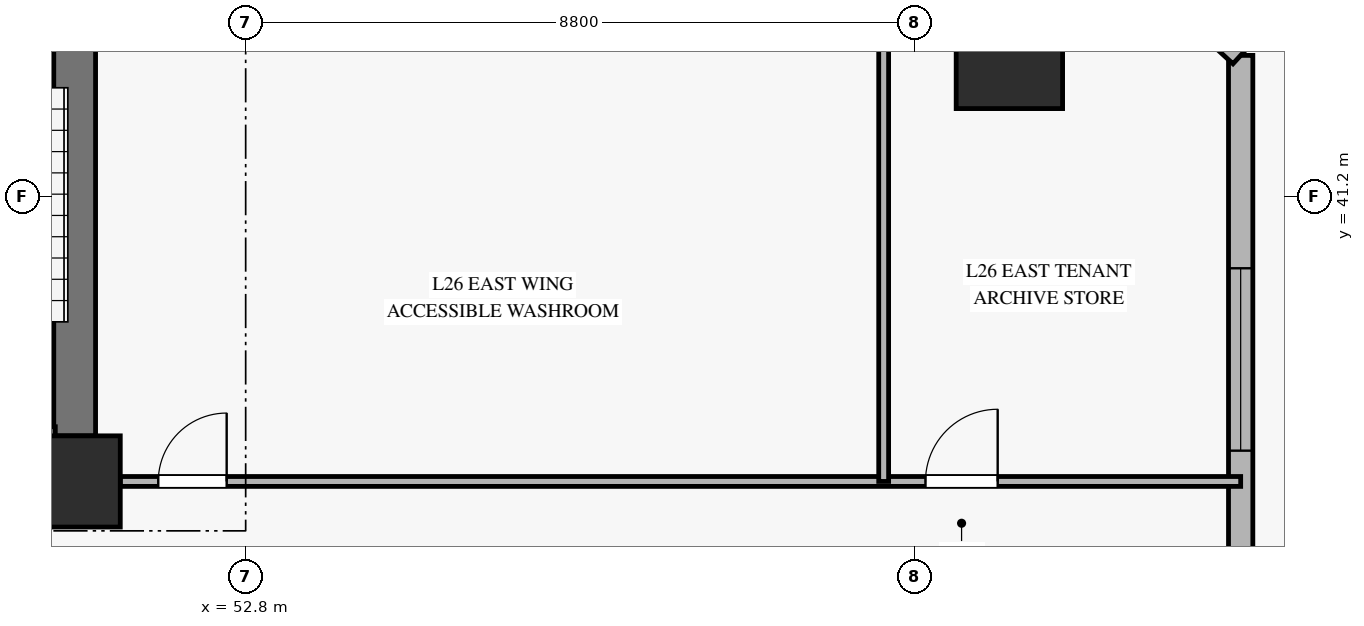
"""IFC4 building model, lengths in metres.
Left out: names, types, materials, properties, quantities, classifications, styles, units other than length and angle.
Written with IfcOpenShell. Run it as: python <this file> out.ifc"""

import sys

from ifc_helpers import new_model, si_unit, direction, frame, frame_2d, origin, origin_2d, place, context, subcontext, project, spatial, rectangle, hollow_rectangle, extrude, source, transform, mapped, element, fill, save


model = new_model("IFC4")
c1 = context("Model", 3, precision=1e-05, world=origin(), true_north=direction((0.0, 1.0)))
c2 = subcontext(c1, "Body", "Model", "MODEL_VIEW")
j1 = project(units=[si_unit("LENGTHUNIT", "METRE"), si_unit("PLANEANGLEUNIT", "RADIAN")], contexts=[c1])
p1 = place(None, origin())
s1 = spatial("IfcSite", under=j1, at=p1, CompositionType="ELEMENT")
p2 = place(p1, origin())
s2 = spatial("IfcBuilding", under=s1, at=p2, CompositionType="ELEMENT")
p3 = place(p2, frame((0.0, 0.0, 107.5)))
s3 = spatial("IfcBuildingStorey", under=s2, at=p3, CompositionType="ELEMENT", Elevation=107.5)
m1 = source(origin(), c2, "Body", "SweptSolid", [
    extrude(rectangle(XDim=1.2, YDim=1.2, at=origin_2d()), origin(), (0.0, 0.0, 1.0), 3.68),
])
p4 = place(p3, frame((50.55, 37.45, 0.0), z_axis=(0.0, 0.0, 1.0), x_axis=(1.0, 0.0, 0.0)))
e1 = element("IfcColumn", 1, at=p4, inside=s3, PredefinedType="PILASTER", context=c2, shape_type="MappedRepresentation", body=[
    mapped(m1, transform((0.0, 0.0, 0.0), x_axis=(1.0, 0.0, 0.0), y_axis=(0.0, 1.0, 0.0), z_axis=(0.0, 0.0, 1.0), scale=1.0)),
])
p5 = place(p3, frame((50.55, 38.05, 0.0), z_axis=(0.0, 0.0, 1.0), x_axis=(0.0, 1.0, 0.0)))
e2 = element("IfcWall", 2, at=p5, inside=s3, PredefinedType="SHEAR", context=c2, shape_type="SweptSolid", body=[
    extrude(rectangle(XDim=7.9, YDim=0.55, at=frame_2d((3.95, 0.0))), origin(), (0.0, 0.0, 1.0), 3.68),
])
m2 = source(origin(), c2, "Body", "SweptSolid", [
    extrude(hollow_rectangle(XDim=1.4, YDim=1.4, WallThickness=0.065, at=origin_2d()), origin(), (0.0, 0.0, 1.0), 3.686),
])
p6 = place(p3, frame((62.848, 43.056, 0.0), z_axis=(-0.056697397557, 0.007352115805, 0.998364338057), x_axis=(-0.128596227734, -0.991697035497, 0.0)))
e3 = element("IfcColumn", 3, at=p6, inside=s3, PredefinedType="COLUMN", context=c2, shape_type="MappedRepresentation", body=[
    mapped(m2, transform((0.0, 0.0, 0.0), x_axis=(1.0, 0.0, 0.0), y_axis=(0.0, 1.0, 0.0), z_axis=(0.0, 0.0, 1.0), scale=1.0)),
])
p7 = place(p3, frame((65.891, 26.73, 0.0), z_axis=(0.0, 0.0, 1.0), x_axis=(0.0, 1.0, 0.0)))
e4 = element("IfcWall", 4, at=p7, inside=s3, PredefinedType="SOLIDWALL", context=c2, shape_type="SweptSolid", body=[
    extrude(rectangle(XDim=16.326, YDim=0.32, at=frame_2d((8.163, 0.0))), origin(), (0.0, 0.0, 1.0), 3.16),
])
p8 = place(p7, frame((11.125, 0.0, 0.45)))
e5 = element("IfcOpeningElement", 5, at=p8, cuts=e4, PredefinedType="OPENING", context=c2, shape_type="SweptSolid", body=[
    extrude(rectangle(XDim=2.4, YDim=2.1, at=frame_2d((1.2, 1.05))), frame((0.0, 0.17, 0.0), z_axis=(0.0, -1.0, 0.0), x_axis=(1.0, 0.0, 0.0)), (0.0, 0.0, 1.0), 0.34),
])
p9 = place(p3, frame((65.891, 43.056, 0.0), z_axis=(0.0, 0.0, 1.0), x_axis=(-0.737992850114, 0.674808530755, 0.0)))
e6 = element("IfcWall", 6, at=p9, inside=s3, PredefinedType="SOLIDWALL", context=c2, shape_type="SweptSolid", body=[
    extrude(rectangle(XDim=4.733, YDim=0.3, at=frame_2d((2.367, 0.0))), origin(), (0.0, 0.0, 1.0), 3.16),
])
p10 = place(p9, frame((1.567, 0.0, 0.45)))
e7 = element("IfcOpeningElement", 7, at=p10, cuts=e6, PredefinedType="OPENING", context=c2, shape_type="SweptSolid", body=[
    extrude(rectangle(XDim=1.6, YDim=2.0, at=frame_2d((0.8, 1.0))), frame((0.0, 0.16, 0.0), z_axis=(0.0, -1.0, 0.0), x_axis=(1.0, 0.0, 0.0)), (0.0, 0.0, 1.0), 0.32),
])
p11 = place(p3, frame((47.44, 38.07, 0.0), z_axis=(0.0, 0.0, 1.0), x_axis=(1.0, 0.0, 0.0)))
e8 = element("IfcWall", 8, at=p11, inside=s3, PredefinedType="SOLIDWALL", context=c2, shape_type="SweptSolid", body=[
    extrude(rectangle(XDim=2.855, YDim=0.2, at=frame_2d((1.427, 0.0))), origin(), (0.0, 0.0, 1.0), 3.9),
])
p12 = place(p3, frame((51.15, 37.45, 0.0), z_axis=(0.0, 0.0, 1.0), x_axis=(1.0, 0.0, 0.0)))
e9 = element("IfcWall", 9, at=p12, inside=s3, PredefinedType="PARTITIONING", context=c2, shape_type="SweptSolid", body=[
    extrude(rectangle(XDim=14.741, YDim=0.13, at=frame_2d((7.371, 0.0))), origin(), (0.0, 0.0, 1.0), 3.165),
])
p13 = place(p12, frame((0.5, 0.0, 0.0)))
e10 = element("IfcOpeningElement", 10, at=p13, cuts=e9, PredefinedType="OPENING", context=c2, shape_type="SweptSolid", body=[
    extrude(rectangle(XDim=0.9, YDim=2.1, at=frame_2d((0.45, 1.05))), frame((0.0, 0.075, 0.0), z_axis=(0.0, -1.0, 0.0), x_axis=(1.0, 0.0, 0.0)), (0.0, 0.0, 1.0), 0.15),
])
p14 = place(p12, frame((10.594, 0.0, 0.0)))
e11 = element("IfcOpeningElement", 11, at=p14, cuts=e9, PredefinedType="OPENING", context=c2, shape_type="SweptSolid", body=[
    extrude(rectangle(XDim=0.95, YDim=2.1, at=frame_2d((0.475, 1.05))), frame((0.0, 0.075, 0.0), z_axis=(0.0, -1.0, 0.0), x_axis=(1.0, 0.0, 0.0)), (0.0, 0.0, 1.0), 0.15),
])
p15 = place(p3, frame((61.194, 37.45, 0.0), z_axis=(0.0, 0.0, 1.0), x_axis=(0.0, 1.0, 0.0)))
e12 = element("IfcWall", 12, at=p15, inside=s3, PredefinedType="PARTITIONING", context=c2, shape_type="SweptSolid", body=[
    extrude(rectangle(XDim=8.8, YDim=0.13, at=frame_2d((4.4, 0.0))), origin(), (0.0, 0.0, 1.0), 3.68),
])
m3 = source(origin(), c2, "Body", "SweptSolid", [
    extrude(rectangle(XDim=2.4, YDim=2.1, at=frame_2d((1.2, 1.05))), frame((0.0, 0.03, 0.0), z_axis=(0.0, -1.0, 0.0), x_axis=(1.0, 0.0, 0.0)), (0.0, 0.0, 1.0), 0.06),
])
p16 = place(p8, origin())
e13 = element("IfcWindow", 13, at=p16, inside=s3, PartitioningType="SINGLE_PANEL", PredefinedType="WINDOW", context=c2, shape_type="MappedRepresentation", body=[
    mapped(m3, transform((0.0, 0.0, 0.0), x_axis=(1.0, 0.0, 0.0), y_axis=(0.0, 1.0, 0.0), z_axis=(0.0, 0.0, 1.0), scale=1.0)),
])
fill(e5, e13)
m4 = source(origin(), c2, "Body", "SweptSolid", [
    extrude(rectangle(XDim=0.9, YDim=2.1, at=frame_2d((0.45, 1.05))), frame((0.0, 0.025, 0.0), z_axis=(0.0, -1.0, 0.0), x_axis=(1.0, 0.0, 0.0)), (0.0, 0.0, 1.0), 0.05),
])
p17 = place(p13, origin())
e14 = element("IfcDoor", 14, at=p17, inside=s3, OperationType="SINGLE_SWING_RIGHT", PredefinedType="DOOR", context=c2, shape_type="MappedRepresentation", body=[
    mapped(m4, transform((0.0, 0.0, 0.0), x_axis=(1.0, 0.0, 0.0), y_axis=(0.0, 1.0, 0.0), z_axis=(0.0, 0.0, 1.0), scale=1.0)),
])
fill(e10, e14)
m5 = source(origin(), c2, "Body", "SweptSolid", [
    extrude(rectangle(XDim=0.95, YDim=2.1, at=frame_2d((0.475, 1.05))), frame((0.0, 0.025, 0.0), z_axis=(0.0, -1.0, 0.0), x_axis=(1.0, 0.0, 0.0)), (0.0, 0.0, 1.0), 0.05),
])
p18 = place(p14, origin())
e15 = element("IfcDoor", 15, at=p18, inside=s3, OperationType="SINGLE_SWING_RIGHT", PredefinedType="DOOR", context=c2, shape_type="MappedRepresentation", body=[
    mapped(m5, transform((0.0, 0.0, 0.0), x_axis=(1.0, 0.0, 0.0), y_axis=(0.0, 1.0, 0.0), z_axis=(0.0, 0.0, 1.0), scale=1.0)),
])
fill(e11, e15)
save(model, sys.argv[1])
